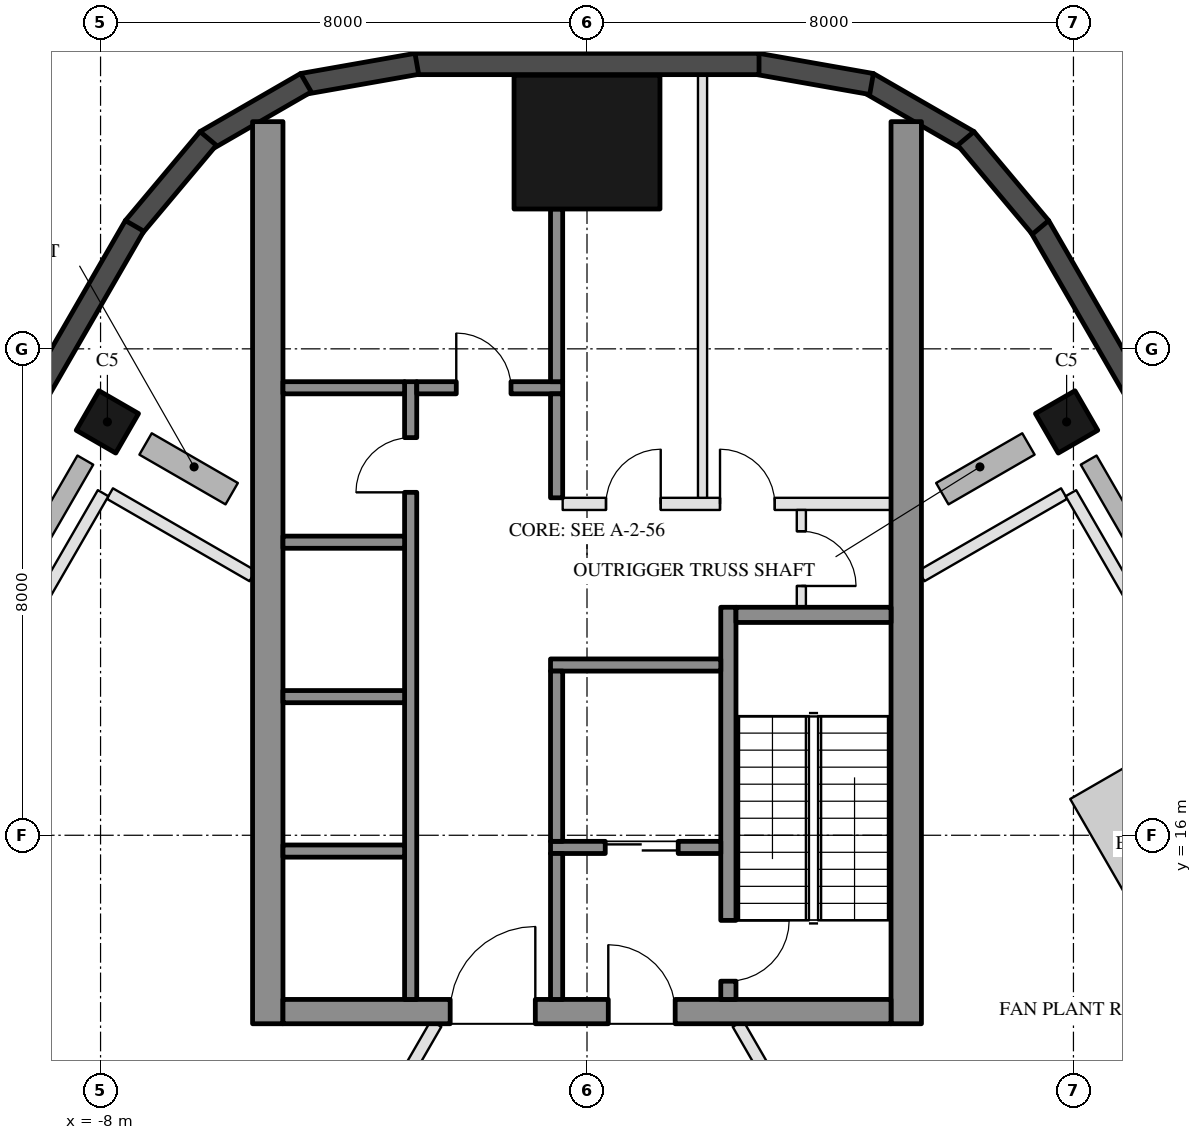
"""IFC4 building model, lengths in metres.
Left out: names, types, materials, properties, quantities, classifications, styles, units other than length and angle.
Written with IfcOpenShell. Run it as: python <this file> out.ifc"""

import sys

from ifc_helpers import new_model, si_unit, direction, frame, frame_2d, origin, origin_2d, place, context, subcontext, project, spatial, rectangle, hollow_rectangle, extrude, element, fill, save


model = new_model("IFC4")
c1 = context("Model", 3, precision=1e-05, world=origin(), true_north=direction((0.0, 1.0)))
c2 = subcontext(c1, "Body", "Model", "MODEL_VIEW")
j1 = project(units=[si_unit("LENGTHUNIT", "METRE"), si_unit("PLANEANGLEUNIT", "RADIAN")], contexts=[c1])
p1 = place(None, origin())
s1 = spatial("IfcSite", under=j1, at=p1, CompositionType="ELEMENT")
p2 = place(p1, origin())
s2 = spatial("IfcBuilding", under=s1, at=p2, CompositionType="ELEMENT")
p3 = place(p2, frame((0.0, 0.0, 242.2)))
s3 = spatial("IfcBuildingStorey", under=s2, at=p3, CompositionType="ELEMENT", Elevation=242.2)
for number, where, z_axis, x_axis in (
    (1, (7.888, 22.798, 0.0), (0.0, 0.0, 1.0), (-0.5, 0.866, 0.0)),
    (2, (-7.888, 22.798, 0.0), (0.0, 0.0, 1.0), (0.5, 0.866, 0.0)),
):
    element("IfcColumn", number, at=place(p3, frame(where, z_axis=z_axis, x_axis=x_axis)), inside=s3, PredefinedType="COLUMN", context=c2, shape_type="SweptSolid", body=[
        extrude(hollow_rectangle(XDim=0.75, YDim=0.75, WallThickness=0.035, at=origin_2d()), origin(), (0.0, 0.0, 1.0), 4.5),
    ])
p4 = place(p3, frame((0.0, 27.4, 0.0), z_axis=(0.0, 0.0, 1.0), x_axis=(1.0, 0.0, 0.0)))
e3 = element("IfcColumn", 3, at=p4, inside=s3, PredefinedType="COLUMN", context=c2, shape_type="SweptSolid", body=[
    extrude(hollow_rectangle(XDim=2.4, YDim=2.2, WallThickness=0.06, at=origin_2d()), origin(), (0.0, 0.0, 1.0), 4.5),
])
for number, where, z_axis, x_axis in (
    (4, (6.277, 27.422, 0.0), (0.0, 0.0, 1.0), (-0.866, 0.5, 0.0)),
    (5, (4.68, 28.356, 0.0), (0.0, 0.0, 1.0), (-0.985, 0.174, 0.0)),
):
    element("IfcWall", number, at=place(p3, frame(where, z_axis=z_axis, x_axis=x_axis)), inside=s3, PredefinedType="SOLIDWALL", context=c2, shape_type="SweptSolid", body=[
        extrude(rectangle(XDim=1.91, YDim=0.35, at=frame_2d((0.955, 0.0))), origin(), (0.0, 0.0, 1.0), 4.35),
    ])
p5 = place(p3, frame((2.829, 28.685, 0.0), z_axis=(0.0, 0.0, 1.0), x_axis=(-1.0, 0.0, 0.0)))
e6 = element("IfcWall", 6, at=p5, inside=s3, PredefinedType="SOLIDWALL", context=c2, shape_type="SweptSolid", body=[
    extrude(rectangle(XDim=5.658, YDim=0.35, at=frame_2d((2.829, 0.0))), origin(), (0.0, 0.0, 1.0), 4.35),
])
for number, where, z_axis, x_axis in (
    (7, (-2.799, 28.688, 0.0), (0.0, 0.0, 1.0), (-0.985, -0.174, 0.0)),
    (8, (-4.623, 28.377, 0.0), (0.0, 0.0, 1.0), (-0.866, -0.5, 0.0)),
):
    element("IfcWall", number, at=place(p3, frame(where, z_axis=z_axis, x_axis=x_axis)), inside=s3, PredefinedType="SOLIDWALL", context=c2, shape_type="SweptSolid", body=[
        extrude(rectangle(XDim=1.91, YDim=0.35, at=frame_2d((0.955, 0.0))), origin(), (0.0, 0.0, 1.0), 4.35),
    ])
p6 = place(p3, frame((-6.23, 27.461, 0.0), z_axis=(0.0, 0.0, 1.0), x_axis=(-0.642808304945, -0.766027077259, 0.0)))
e9 = element("IfcWall", 9, at=p6, inside=s3, PredefinedType="SOLIDWALL", context=c2, shape_type="SweptSolid", body=[
    extrude(rectangle(XDim=1.91, YDim=0.35, at=frame_2d((0.955, 0.0))), origin(), (0.0, 0.0, 1.0), 4.35),
])
for number, where, z_axis, x_axis in (
    (10, (-7.441, 26.022, 0.0), (0.0, 0.0, 1.0), (-0.5, -0.866, 0.0)),
    (11, (26.256, -6.567, 0.0), (0.0, 0.0, 1.0), (-0.5, 0.866, 0.0)),
):
    element("IfcWall", number, at=place(p3, frame(where, z_axis=z_axis, x_axis=x_axis)), inside=s3, PredefinedType="SOLIDWALL", context=c2, shape_type="SweptSolid", body=[
        extrude(rectangle(XDim=37.631, YDim=0.35, at=frame_2d((18.816, 0.0))), origin(), (0.0, 0.0, 1.0), 4.35),
    ])
p7 = place(p3, frame((7.458, 25.998, 0.0), z_axis=(0.0, 0.0, 1.0), x_axis=(-0.642808304945, 0.766027077259, 0.0)))
e12 = element("IfcWall", 12, at=p7, inside=s3, PredefinedType="SOLIDWALL", context=c2, shape_type="SweptSolid", body=[
    extrude(rectangle(XDim=1.91, YDim=0.35, at=frame_2d((0.955, 0.0))), origin(), (0.0, 0.0, 1.0), 4.35),
])
for number, where, z_axis, x_axis in (
    (13, (5.25, 12.9, 0.0), (0.0, 0.0, 1.0), (0.0, 1.0, 0.0)),
    (14, (-5.25, 12.9, 0.0), (0.0, 0.0, 1.0), (0.0, 1.0, 0.0)),
):
    element("IfcWall", number, at=place(p3, frame(where, z_axis=z_axis, x_axis=x_axis)), inside=s3, PredefinedType="SHEAR", context=c2, shape_type="SweptSolid", body=[
        extrude(rectangle(XDim=14.837, YDim=0.5, at=frame_2d((7.418, 0.0))), origin(), (0.0, 0.0, 1.0), 4.3),
    ])
p8 = place(p3, frame((5.0, 13.1, 0.0), z_axis=(0.0, 0.0, 1.0), x_axis=(-1.0, 0.0, 0.0)))
e15 = element("IfcWall", 15, at=p8, inside=s3, PredefinedType="SHEAR", context=c2, shape_type="SweptSolid", body=[
    extrude(rectangle(XDim=10.0, YDim=0.4, at=frame_2d((5.0, 0.0))), origin(), (0.0, 0.0, 1.0), 4.3),
])
p9 = place(p8, frame((3.55, 0.0, 0.0)))
e16 = element("IfcOpeningElement", 16, at=p9, cuts=e15, PredefinedType="OPENING", context=c2, shape_type="SweptSolid", body=[
    extrude(rectangle(XDim=1.1, YDim=2.1, at=frame_2d((0.55, 1.05))), frame((0.0, 0.21, 0.0), z_axis=(0.0, -1.0, 0.0), x_axis=(1.0, 0.0, 0.0)), (0.0, 0.0, 1.0), 0.42),
])
p10 = place(p8, frame((5.85, 0.0, 0.0)))
e17 = element("IfcOpeningElement", 17, at=p10, cuts=e15, PredefinedType="OPENING", context=c2, shape_type="SweptSolid", body=[
    extrude(rectangle(XDim=1.4, YDim=2.1, at=frame_2d((0.7, 1.05))), frame((0.0, 0.21, 0.0), z_axis=(0.0, -1.0, 0.0), x_axis=(1.0, 0.0, 0.0)), (0.0, 0.0, 1.0), 0.42),
])
p11 = place(p3, frame((2.325, 13.3, 0.0), z_axis=(0.0, 0.0, 1.0), x_axis=(0.0, 1.0, 0.0)))
e18 = element("IfcWall", 18, at=p11, inside=s3, PredefinedType="SHEAR", context=c2, shape_type="SweptSolid", body=[
    extrude(rectangle(XDim=6.45, YDim=0.25, at=frame_2d((3.225, 0.0))), origin(), (0.0, 0.0, 1.0), 4.3),
])
p12 = place(p11, frame((0.3, 0.0, 0.0)))
e19 = element("IfcOpeningElement", 19, at=p12, cuts=e18, PredefinedType="OPENING", context=c2, shape_type="SweptSolid", body=[
    extrude(rectangle(XDim=1.0, YDim=2.1, at=frame_2d((0.5, 1.05))), frame((0.0, 0.135, 0.0), z_axis=(0.0, -1.0, 0.0), x_axis=(1.0, 0.0, 0.0)), (0.0, 0.0, 1.0), 0.27),
])
p13 = place(p3, frame((5.0, 19.625, 0.0), z_axis=(0.0, 0.0, 1.0), x_axis=(-1.0, 0.0, 0.0)))
e20 = element("IfcWall", 20, at=p13, inside=s3, PredefinedType="SHEAR", context=c2, shape_type="SweptSolid", body=[
    extrude(rectangle(XDim=2.55, YDim=0.25, at=frame_2d((1.275, 0.0))), origin(), (0.0, 0.0, 1.0), 4.3),
])
p14 = place(p3, frame((2.2, 18.8, 0.0), z_axis=(0.0, 0.0, 1.0), x_axis=(-1.0, 0.0, 0.0)))
e21 = element("IfcWall", 21, at=p14, inside=s3, PredefinedType="SHEAR", context=c2, shape_type="SweptSolid", body=[
    extrude(rectangle(XDim=2.8, YDim=0.2, at=frame_2d((1.4, 0.0))), origin(), (0.0, 0.0, 1.0), 4.3),
])
p15 = place(p3, frame((2.2, 15.8, 0.0), z_axis=(0.0, 0.0, 1.0), x_axis=(-1.0, 0.0, 0.0)))
e22 = element("IfcWall", 22, at=p15, inside=s3, PredefinedType="SHEAR", context=c2, shape_type="SweptSolid", body=[
    extrude(rectangle(XDim=2.8, YDim=0.2, at=frame_2d((1.4, 0.0))), origin(), (0.0, 0.0, 1.0), 4.3),
])
p16 = place(p15, frame((0.7, 0.0, 0.0)))
e23 = element("IfcOpeningElement", 23, at=p16, cuts=e22, PredefinedType="OPENING", context=c2, shape_type="SweptSolid", body=[
    extrude(rectangle(XDim=1.2, YDim=2.1, at=frame_2d((0.6, 1.05))), frame((0.0, 0.11, 0.0), z_axis=(0.0, -1.0, 0.0), x_axis=(1.0, 0.0, 0.0)), (0.0, 0.0, 1.0), 0.22),
])
p17 = place(p3, frame((-0.5, 15.9, 0.0), z_axis=(0.0, 0.0, 1.0), x_axis=(0.0, 1.0, 0.0)))
e24 = element("IfcWall", 24, at=p17, inside=s3, PredefinedType="SHEAR", context=c2, shape_type="SweptSolid", body=[
    extrude(rectangle(XDim=2.8, YDim=0.2, at=frame_2d((1.4, 0.0))), origin(), (0.0, 0.0, 1.0), 4.3),
])
p18 = place(p3, frame((-0.5, 13.3, 0.0), z_axis=(0.0, 0.0, 1.0), x_axis=(0.0, 1.0, 0.0)))
e25 = element("IfcWall", 25, at=p18, inside=s3, PredefinedType="SHEAR", context=c2, shape_type="SweptSolid", body=[
    extrude(rectangle(XDim=2.4, YDim=0.2, at=frame_2d((1.2, 0.0))), origin(), (0.0, 0.0, 1.0), 4.3),
])
p19 = place(p3, frame((-2.9, 13.3, 0.0), z_axis=(0.0, 0.0, 1.0), x_axis=(0.0, 1.0, 0.0)))
e26 = element("IfcWall", 26, at=p19, inside=s3, PredefinedType="SHEAR", context=c2, shape_type="SweptSolid", body=[
    extrude(rectangle(XDim=10.16, YDim=0.2, at=frame_2d((5.08, 0.0))), origin(), (0.0, 0.0, 1.0), 4.3),
])
p20 = place(p19, frame((8.34, 0.0, 0.0)))
e27 = element("IfcOpeningElement", 27, at=p20, cuts=e26, PredefinedType="OPENING", context=c2, shape_type="SweptSolid", body=[
    extrude(rectangle(XDim=0.9, YDim=2.1, at=frame_2d((0.45, 1.05))), frame((0.0, 0.11, 0.0), z_axis=(0.0, -1.0, 0.0), x_axis=(1.0, 0.0, 0.0)), (0.0, 0.0, 1.0), 0.22),
])
p21 = place(p3, frame((-0.4, 23.36, 0.0), z_axis=(0.0, 0.0, 1.0), x_axis=(-1.0, 0.0, 0.0)))
e28 = element("IfcWall", 28, at=p21, inside=s3, PredefinedType="SHEAR", context=c2, shape_type="SweptSolid", body=[
    extrude(rectangle(XDim=2.4, YDim=0.2, at=frame_2d((1.2, 0.0))), origin(), (0.0, 0.0, 1.0), 4.3),
])
p22 = place(p21, frame((0.85, 0.0, 0.0)))
e29 = element("IfcOpeningElement", 29, at=p22, cuts=e28, PredefinedType="OPENING", context=c2, shape_type="SweptSolid", body=[
    extrude(rectangle(XDim=0.9, YDim=2.1, at=frame_2d((0.45, 1.05))), frame((0.0, 0.11, 0.0), z_axis=(0.0, -1.0, 0.0), x_axis=(1.0, 0.0, 0.0)), (0.0, 0.0, 1.0), 0.22),
])
p23 = place(p3, frame((-0.5, 21.55, 0.0), z_axis=(0.0, 0.0, 1.0), x_axis=(0.0, 1.0, 0.0)))
e30 = element("IfcWall", 30, at=p23, inside=s3, PredefinedType="SHEAR", context=c2, shape_type="SweptSolid", body=[
    extrude(rectangle(XDim=1.71, YDim=0.2, at=frame_2d((0.855, 0.0))), origin(), (0.0, 0.0, 1.0), 4.3),
])
for number, where, z_axis, x_axis in (
    (31, (-3.0, 15.74, 0.0), (0.0, 0.0, 1.0), (-1.0, 0.0, 0.0)),
    (32, (-3.0, 18.28, 0.0), (0.0, 0.0, 1.0), (-1.0, 0.0, 0.0)),
    (33, (-3.0, 20.82, 0.0), (0.0, 0.0, 1.0), (-1.0, 0.0, 0.0)),
    (34, (-3.0, 23.36, 0.0), (0.0, 0.0, 1.0), (-1.0, 0.0, 0.0)),
):
    element("IfcWall", number, at=place(p3, frame(where, z_axis=z_axis, x_axis=x_axis)), inside=s3, PredefinedType="SHEAR", context=c2, shape_type="SweptSolid", body=[
        extrude(rectangle(XDim=2.0, YDim=0.2, at=frame_2d((1.0, 0.0))), origin(), (0.0, 0.0, 1.0), 4.3),
    ])
p24 = place(p3, frame((-0.5, 23.46, 0.0), z_axis=(0.0, 0.0, 1.0), x_axis=(0.0, 1.0, 0.0)))
e35 = element("IfcWall", 35, at=p24, inside=s3, PredefinedType="SHEAR", context=c2, shape_type="SweptSolid", body=[
    extrude(rectangle(XDim=2.84, YDim=0.2, at=frame_2d((1.42, 0.0))), origin(), (0.0, 0.0, 1.0), 4.3),
])
p25 = place(p3, frame((5.0, 21.45, 0.0), z_axis=(0.0, 0.0, 1.0), x_axis=(-1.0, 0.0, 0.0)))
e36 = element("IfcWall", 36, at=p25, inside=s3, PredefinedType="PARTITIONING", context=c2, shape_type="SweptSolid", body=[
    extrude(rectangle(XDim=5.4, YDim=0.2, at=frame_2d((2.7, 0.0))), origin(), (0.0, 0.0, 1.0), 4.3),
])
p26 = place(p25, frame((1.913, 0.0, 0.0)))
e37 = element("IfcOpeningElement", 37, at=p26, cuts=e36, PredefinedType="OPENING", context=c2, shape_type="SweptSolid", body=[
    extrude(rectangle(XDim=0.9, YDim=2.1, at=frame_2d((0.45, 1.05))), frame((0.0, 0.11, 0.0), z_axis=(0.0, -1.0, 0.0), x_axis=(1.0, 0.0, 0.0)), (0.0, 0.0, 1.0), 0.22),
])
p27 = place(p25, frame((3.788, 0.0, 0.0)))
e38 = element("IfcOpeningElement", 38, at=p27, cuts=e36, PredefinedType="OPENING", context=c2, shape_type="SweptSolid", body=[
    extrude(rectangle(XDim=0.9, YDim=2.1, at=frame_2d((0.45, 1.05))), frame((0.0, 0.11, 0.0), z_axis=(0.0, -1.0, 0.0), x_axis=(1.0, 0.0, 0.0)), (0.0, 0.0, 1.0), 0.22),
])
p28 = place(p3, frame((3.525, 19.75, 0.0), z_axis=(0.0, 0.0, 1.0), x_axis=(0.0, 1.0, 0.0)))
e39 = element("IfcWall", 39, at=p28, inside=s3, PredefinedType="PARTITIONING", context=c2, shape_type="SweptSolid", body=[
    extrude(rectangle(XDim=1.6, YDim=0.15, at=frame_2d((0.8, 0.0))), origin(), (0.0, 0.0, 1.0), 4.3),
])
p29 = place(p28, frame((0.35, 0.0, 0.0)))
e40 = element("IfcOpeningElement", 40, at=p29, cuts=e39, PredefinedType="OPENING", context=c2, shape_type="SweptSolid", body=[
    extrude(rectangle(XDim=0.9, YDim=2.1, at=frame_2d((0.45, 1.05))), frame((0.0, 0.085, 0.0), z_axis=(0.0, -1.0, 0.0), x_axis=(1.0, 0.0, 0.0)), (0.0, 0.0, 1.0), 0.17),
])
p30 = place(p3, frame((1.9, 21.55, 0.0), z_axis=(0.0, 0.0, 1.0), x_axis=(0.0, 1.0, 0.0)))
e41 = element("IfcWall", 41, at=p30, inside=s3, PredefinedType="PARTITIONING", context=c2, shape_type="SweptSolid", body=[
    extrude(rectangle(XDim=6.95, YDim=0.15, at=frame_2d((3.475, 0.0))), origin(), (0.0, 0.0, 1.0), 4.3),
])
p31 = place(p3, frame((7.846, 21.62, 0.0), z_axis=(0.0, 0.0, 1.0), x_axis=(-0.866022026288, -0.50000584995, 0.0)))
e42 = element("IfcWall", 42, at=p31, inside=s3, PredefinedType="PARTITIONING", context=c2, shape_type="SweptSolid", body=[
    extrude(rectangle(XDim=2.709, YDim=0.2, at=frame_2d((1.355, 0.0))), origin(), (0.0, 0.0, 1.0), 4.35),
])
p32 = place(p3, frame((22.708, -3.921, 0.0), z_axis=(0.0, 0.0, 1.0), x_axis=(-0.499998500593, 0.866026269466, 0.0)))
e43 = element("IfcWall", 43, at=p32, inside=s3, PredefinedType="PARTITIONING", context=c2, shape_type="SweptSolid", body=[
    extrude(rectangle(XDim=29.5, YDim=0.2, at=frame_2d((14.75, 0.0))), origin(), (0.0, 0.0, 1.0), 3.75),
])
p33 = place(p3, frame((12.413, -4.3, 0.0), z_axis=(0.0, 0.0, 1.0), x_axis=(-0.50000478328, 0.866022642139, 0.0)))
e44 = element("IfcWall", 44, at=p33, inside=s3, PredefinedType="PARTITIONING", context=c2, shape_type="SweptSolid", body=[
    extrude(rectangle(XDim=19.861, YDim=0.2, at=frame_2d((9.931, 0.0))), origin(), (0.0, 0.0, 1.0), 3.75),
])
p34 = place(p33, frame((2.121, 0.0, 0.0)))
e45 = element("IfcOpeningElement", 45, at=p34, cuts=e44, PredefinedType="OPENING", context=c2, shape_type="SweptSolid", body=[
    extrude(rectangle(XDim=1.2, YDim=2.1, at=frame_2d((0.6, 1.05))), frame((0.0, 0.11, 0.0), z_axis=(0.0, -1.0, 0.0), x_axis=(1.0, 0.0, 0.0)), (0.0, 0.0, 1.0), 0.22),
])
p35 = place(p33, frame((8.831, 0.0, 0.0)))
e46 = element("IfcOpeningElement", 46, at=p35, cuts=e44, PredefinedType="OPENING", context=c2, shape_type="SweptSolid", body=[
    extrude(rectangle(XDim=1.2, YDim=2.1, at=frame_2d((0.6, 1.05))), frame((0.0, 0.11, 0.0), z_axis=(0.0, -1.0, 0.0), x_axis=(1.0, 0.0, 0.0)), (0.0, 0.0, 1.0), 0.22),
])
p36 = place(p33, frame((16.04, 0.0, 0.0)))
e47 = element("IfcOpeningElement", 47, at=p36, cuts=e44, PredefinedType="OPENING", context=c2, shape_type="SweptSolid", body=[
    extrude(rectangle(XDim=1.2, YDim=2.1, at=frame_2d((0.6, 1.05))), frame((0.0, 0.11, 0.0), z_axis=(0.0, -1.0, 0.0), x_axis=(1.0, 0.0, 0.0)), (0.0, 0.0, 1.0), 0.22),
])
p37 = place(p3, frame((-7.846, 21.62, 0.0), z_axis=(0.0, 0.0, 1.0), x_axis=(0.866022026288, -0.50000584995, 0.0)))
e48 = element("IfcWall", 48, at=p37, inside=s3, PredefinedType="PARTITIONING", context=c2, shape_type="SweptSolid", body=[
    extrude(rectangle(XDim=2.709, YDim=0.2, at=frame_2d((1.355, 0.0))), origin(), (0.0, 0.0, 1.0), 4.35),
])
p38 = place(p3, frame((-7.958, 21.626, 0.0), z_axis=(0.0, 0.0, 1.0), x_axis=(-0.499998500593, -0.866026269466, 0.0)))
e49 = element("IfcWall", 49, at=p38, inside=s3, PredefinedType="PARTITIONING", context=c2, shape_type="SweptSolid", body=[
    extrude(rectangle(XDim=29.5, YDim=0.2, at=frame_2d((14.75, 0.0))), origin(), (0.0, 0.0, 1.0), 3.75),
])
p39 = place(p3, frame((-2.482, 12.9, 0.0), z_axis=(0.0, 0.0, 1.0), x_axis=(-0.50000478328, -0.866022642139, 0.0)))
e50 = element("IfcWall", 50, at=p39, inside=s3, PredefinedType="PARTITIONING", context=c2, shape_type="SweptSolid", body=[
    extrude(rectangle(XDim=19.861, YDim=0.2, at=frame_2d((9.931, 0.0))), origin(), (0.0, 0.0, 1.0), 3.75),
])
p40 = place(p39, frame((1.635, 0.0, 0.0)))
e51 = element("IfcOpeningElement", 51, at=p40, cuts=e50, PredefinedType="OPENING", context=c2, shape_type="SweptSolid", body=[
    extrude(rectangle(XDim=1.2, YDim=2.1, at=frame_2d((0.6, 1.05))), frame((0.0, 0.11, 0.0), z_axis=(0.0, -1.0, 0.0), x_axis=(1.0, 0.0, 0.0)), (0.0, 0.0, 1.0), 0.22),
])
p41 = place(p39, frame((6.107, 0.0, 0.0)))
e52 = element("IfcOpeningElement", 52, at=p41, cuts=e50, PredefinedType="OPENING", context=c2, shape_type="SweptSolid", body=[
    extrude(rectangle(XDim=1.2, YDim=2.1, at=frame_2d((0.6, 1.05))), frame((0.0, 0.11, 0.0), z_axis=(0.0, -1.0, 0.0), x_axis=(1.0, 0.0, 0.0)), (0.0, 0.0, 1.0), 0.22),
])
p42 = place(p39, frame((11.054, 0.0, 0.0)))
e53 = element("IfcOpeningElement", 53, at=p42, cuts=e50, PredefinedType="OPENING", context=c2, shape_type="SweptSolid", body=[
    extrude(rectangle(XDim=1.2, YDim=2.1, at=frame_2d((0.6, 1.05))), frame((0.0, 0.11, 0.0), z_axis=(0.0, -1.0, 0.0), x_axis=(1.0, 0.0, 0.0)), (0.0, 0.0, 1.0), 0.22),
])
p43 = place(p39, frame((16.526, 0.0, 0.0)))
e54 = element("IfcOpeningElement", 54, at=p43, cuts=e50, PredefinedType="OPENING", context=c2, shape_type="SweptSolid", body=[
    extrude(rectangle(XDim=1.2, YDim=2.1, at=frame_2d((0.6, 1.05))), frame((0.0, 0.11, 0.0), z_axis=(0.0, -1.0, 0.0), x_axis=(1.0, 0.0, 0.0)), (0.0, 0.0, 1.0), 0.22),
])
p44 = place(p16, origin())
e55 = element("IfcDoor", 55, at=p44, inside=s3, OperationType="DOUBLE_DOOR_SLIDING", PredefinedType="DOOR", context=c2, shape_type="SweptSolid", body=[
    extrude(rectangle(XDim=1.2, YDim=2.1, at=frame_2d((0.6, 1.05))), frame((0.0, 0.025, 0.0), z_axis=(0.0, -1.0, 0.0), x_axis=(1.0, 0.0, 0.0)), (0.0, 0.0, 1.0), 0.05),
])
fill(e23, e55)
p45 = place(p29, frame((0.9, 0.0, 0.0), z_axis=(0.0, 0.0, 1.0), x_axis=(-1.0, 0.0, 0.0)))
e56 = element("IfcDoor", 56, at=p45, inside=s3, OperationType="SINGLE_SWING_RIGHT", PredefinedType="DOOR", context=c2, shape_type="SweptSolid", body=[
    extrude(rectangle(XDim=0.9, YDim=2.1, at=frame_2d((0.45, 1.05))), frame((0.0, 0.025, 0.0), z_axis=(0.0, -1.0, 0.0), x_axis=(1.0, 0.0, 0.0)), (0.0, 0.0, 1.0), 0.05),
])
fill(e40, e56)
p46 = place(p20, origin())
e57 = element("IfcDoor", 57, at=p46, inside=s3, OperationType="SINGLE_SWING_LEFT", PredefinedType="DOOR", context=c2, shape_type="SweptSolid", body=[
    extrude(rectangle(XDim=0.9, YDim=2.1, at=frame_2d((0.45, 1.05))), frame((0.0, 0.025, 0.0), z_axis=(0.0, -1.0, 0.0), x_axis=(1.0, 0.0, 0.0)), (0.0, 0.0, 1.0), 0.05),
])
fill(e27, e57)
p47 = place(p22, frame((0.9, 0.0, 0.0), z_axis=(0.0, 0.0, 1.0), x_axis=(-1.0, 0.0, 0.0)))
e58 = element("IfcDoor", 58, at=p47, inside=s3, OperationType="SINGLE_SWING_LEFT", PredefinedType="DOOR", context=c2, shape_type="SweptSolid", body=[
    extrude(rectangle(XDim=0.9, YDim=2.1, at=frame_2d((0.45, 1.05))), frame((0.0, 0.025, 0.0), z_axis=(0.0, -1.0, 0.0), x_axis=(1.0, 0.0, 0.0)), (0.0, 0.0, 1.0), 0.05),
])
fill(e29, e58)
p48 = place(p26, frame((0.9, 0.0, 0.0), z_axis=(0.0, 0.0, 1.0), x_axis=(-1.0, 0.0, 0.0)))
e59 = element("IfcDoor", 59, at=p48, inside=s3, OperationType="SINGLE_SWING_LEFT", PredefinedType="DOOR", context=c2, shape_type="SweptSolid", body=[
    extrude(rectangle(XDim=0.9, YDim=2.1, at=frame_2d((0.45, 1.05))), frame((0.0, 0.025, 0.0), z_axis=(0.0, -1.0, 0.0), x_axis=(1.0, 0.0, 0.0)), (0.0, 0.0, 1.0), 0.05),
])
fill(e37, e59)
p49 = place(p27, frame((0.9, 0.0, 0.0), z_axis=(0.0, 0.0, 1.0), x_axis=(-1.0, 0.0, 0.0)))
e60 = element("IfcDoor", 60, at=p49, inside=s3, OperationType="SINGLE_SWING_RIGHT", PredefinedType="DOOR", context=c2, shape_type="SweptSolid", body=[
    extrude(rectangle(XDim=0.9, YDim=2.1, at=frame_2d((0.45, 1.05))), frame((0.0, 0.025, 0.0), z_axis=(0.0, -1.0, 0.0), x_axis=(1.0, 0.0, 0.0)), (0.0, 0.0, 1.0), 0.05),
])
fill(e38, e60)
p50 = place(p9, frame((1.1, 0.0, 0.0), z_axis=(0.0, 0.0, 1.0), x_axis=(-1.0, 0.0, 0.0)))
e61 = element("IfcDoor", 61, at=p50, inside=s3, OperationType="SINGLE_SWING_LEFT", PredefinedType="DOOR", context=c2, shape_type="SweptSolid", body=[
    extrude(rectangle(XDim=1.1, YDim=2.1, at=frame_2d((0.55, 1.05))), frame((0.0, 0.025, 0.0), z_axis=(0.0, -1.0, 0.0), x_axis=(1.0, 0.0, 0.0)), (0.0, 0.0, 1.0), 0.05),
])
fill(e16, e61)
p51 = place(p10, frame((1.4, 0.0, 0.0), z_axis=(0.0, 0.0, 1.0), x_axis=(-1.0, 0.0, 0.0)))
e62 = element("IfcDoor", 62, at=p51, inside=s3, OperationType="DOUBLE_DOOR_SINGLE_SWING", PredefinedType="DOOR", context=c2, shape_type="SweptSolid", body=[
    extrude(rectangle(XDim=1.4, YDim=2.1, at=frame_2d((0.7, 1.05))), frame((0.0, 0.025, 0.0), z_axis=(0.0, -1.0, 0.0), x_axis=(1.0, 0.0, 0.0)), (0.0, 0.0, 1.0), 0.05),
])
fill(e17, e62)
p52 = place(p12, frame((1.0, 0.0, 0.0), z_axis=(0.0, 0.0, 1.0), x_axis=(-1.0, 0.0, 0.0)))
e63 = element("IfcDoor", 63, at=p52, inside=s3, OperationType="SINGLE_SWING_LEFT", PredefinedType="DOOR", context=c2, shape_type="SweptSolid", body=[
    extrude(rectangle(XDim=1.0, YDim=2.1, at=frame_2d((0.5, 1.05))), frame((0.0, 0.025, 0.0), z_axis=(0.0, -1.0, 0.0), x_axis=(1.0, 0.0, 0.0)), (0.0, 0.0, 1.0), 0.05),
])
fill(e19, e63)
save(model, sys.argv[1])
